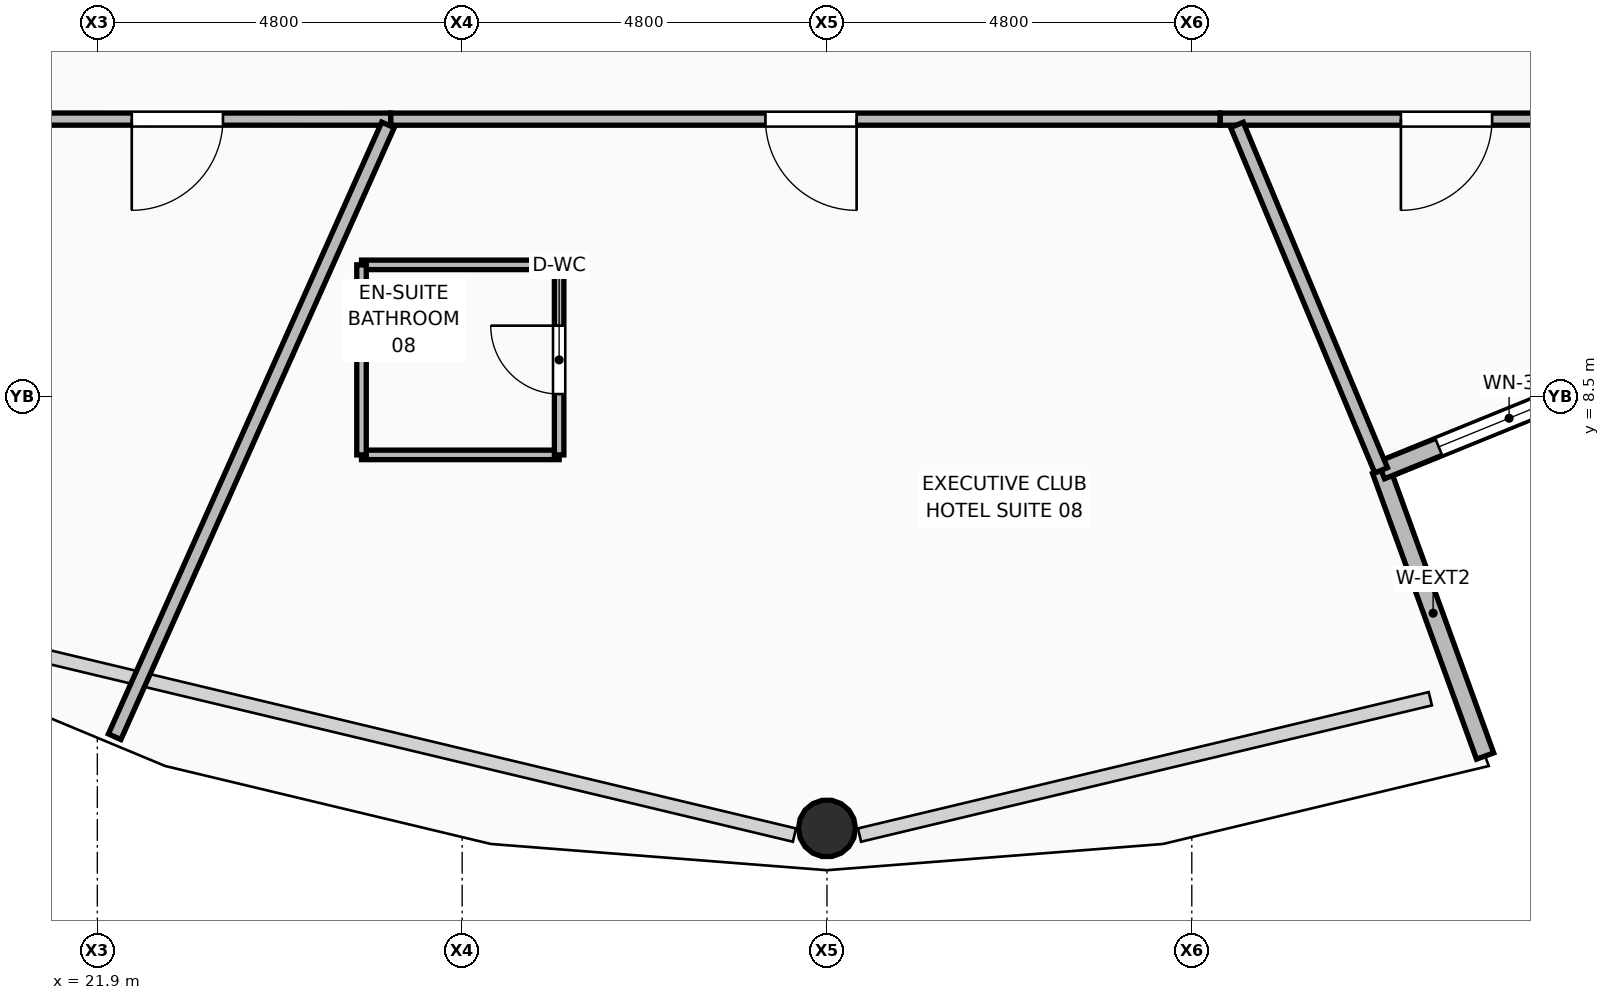
"""IFC4 building model, lengths in metres.
Left out: names, types, materials, properties, quantities, classifications, styles, units other than length and angle.
Written with IfcOpenShell. Run it as: python <this file> out.ifc"""

import sys

from ifc_helpers import new_model, si_unit, direction, frame, frame_2d, origin, origin_2d, place, context, subcontext, project, spatial, rectangle, hollow_circle, extrude, element, fill, save


model = new_model("IFC4")
c1 = context("Model", 3, precision=1e-05, world=origin(), true_north=direction((0.0, 1.0)))
c2 = subcontext(c1, "Body", "Model", "MODEL_VIEW")
j1 = project(units=[si_unit("LENGTHUNIT", "METRE"), si_unit("PLANEANGLEUNIT", "RADIAN")], contexts=[c1])
p1 = place(None, origin())
s1 = spatial("IfcSite", under=j1, at=p1, CompositionType="ELEMENT")
p2 = place(p1, origin())
s2 = spatial("IfcBuilding", under=s1, at=p2, CompositionType="ELEMENT")
p3 = place(p2, frame((0.0, 0.0, 142.2)))
s3 = spatial("IfcBuildingStorey", under=s2, at=p3, CompositionType="ELEMENT", Elevation=142.2)
p4 = place(p3, frame((31.5, 2.82, 0.0), z_axis=(0.0, 0.015658341295, 0.999877400659), x_axis=(-1.0, 0.0, 0.0)))
e1 = element("IfcColumn", 1, at=p4, inside=s3, PredefinedType="COLUMN", context=c2, shape_type="SweptSolid", body=[
    extrude(hollow_circle(Radius=0.375, WallThickness=0.035, at=origin_2d()), origin(), (0.0, 0.0, 1.0), 3.571),
])
p5 = place(p3, frame((40.159, 3.772, 0.0), z_axis=(0.0, 0.0, 1.0), x_axis=(-0.341963571582, 0.939713209288, 0.0)))
e2 = element("IfcWall", 2, at=p5, inside=s3, PredefinedType="SOLIDWALL", context=c2, shape_type="SweptSolid", body=[
    extrude(rectangle(XDim=4.0, YDim=0.24, at=frame_2d((2.0, 0.0))), origin(), (0.0, 0.0, 1.0), 3.57),
])
p6 = place(p3, frame((38.791, 7.531, 0.0), z_axis=(0.0, 0.0, 1.0), x_axis=(0.926307714527, 0.37676785692, 0.0)))
e3 = element("IfcWall", 3, at=p6, inside=s3, PredefinedType="SOLIDWALL", context=c2, shape_type="SweptSolid", body=[
    extrude(rectangle(XDim=3.636, YDim=0.24, at=frame_2d((1.818, 0.0))), origin(), (0.0, 0.0, 1.0), 3.57),
])
p7 = place(p6, frame((0.818, 0.0, 0.85)))
e4 = element("IfcOpeningElement", 4, at=p7, cuts=e3, PredefinedType="OPENING", context=c2, shape_type="SweptSolid", body=[
    extrude(rectangle(XDim=2.0, YDim=2.4, at=frame_2d((1.0, 1.2))), frame((0.0, 0.13, 0.0), z_axis=(0.0, -1.0, 0.0), x_axis=(1.0, 0.0, 0.0)), (0.0, 0.0, 1.0), 0.26),
])
p8 = place(p3, frame((42.926, 12.151, 0.0), z_axis=(0.0, 0.0, 1.0), x_axis=(-1.0, 0.0, 0.0)))
e5 = element("IfcWall", 5, at=p8, inside=s3, PredefinedType="PARTITIONING", context=c2, shape_type="SweptSolid", body=[
    extrude(rectangle(XDim=6.254, YDim=0.16, at=frame_2d((3.127, 0.0))), origin(), (0.0, 0.0, 1.0), 3.006),
])
p9 = place(p8, frame((2.675, 0.0, 0.0)))
e6 = element("IfcOpeningElement", 6, at=p9, cuts=e5, PredefinedType="OPENING", context=c2, shape_type="SweptSolid", body=[
    extrude(rectangle(XDim=1.2, YDim=2.1, at=frame_2d((0.6, 1.05))), frame((0.0, 0.09, 0.0), z_axis=(0.0, -1.0, 0.0), x_axis=(1.0, 0.0, 0.0)), (0.0, 0.0, 1.0), 0.18),
])
p10 = place(p3, frame((36.672, 12.151, 0.0), z_axis=(0.0, 0.0, 1.0), x_axis=(-1.0, 0.0, 0.0)))
e7 = element("IfcWall", 7, at=p10, inside=s3, PredefinedType="PARTITIONING", context=c2, shape_type="SweptSolid", body=[
    extrude(rectangle(XDim=10.913, YDim=0.16, at=frame_2d((5.457, 0.0))), origin(), (0.0, 0.0, 1.0), 3.006),
])
p11 = place(p10, frame((4.782, 0.0, 0.0)))
e8 = element("IfcOpeningElement", 8, at=p11, cuts=e7, PredefinedType="OPENING", context=c2, shape_type="SweptSolid", body=[
    extrude(rectangle(XDim=1.2, YDim=2.1, at=frame_2d((0.6, 1.05))), frame((0.0, 0.09, 0.0), z_axis=(0.0, -1.0, 0.0), x_axis=(1.0, 0.0, 0.0)), (0.0, 0.0, 1.0), 0.18),
])
p12 = place(p3, frame((25.759, 12.151, 0.0), z_axis=(0.0, 0.0, 1.0), x_axis=(-0.999999980593, 0.000197013275, 0.0)))
e9 = element("IfcWall", 9, at=p12, inside=s3, PredefinedType="PARTITIONING", context=c2, shape_type="SweptSolid", body=[
    extrude(rectangle(XDim=6.196, YDim=0.16, at=frame_2d((3.098, 0.0))), origin(), (0.0, 0.0, 1.0), 3.006),
])
p13 = place(p12, frame((2.206, 0.0, 0.0)))
e10 = element("IfcOpeningElement", 10, at=p13, cuts=e9, PredefinedType="OPENING", context=c2, shape_type="SweptSolid", body=[
    extrude(rectangle(XDim=1.2, YDim=2.1, at=frame_2d((0.6, 1.05))), frame((0.0, 0.09, 0.0), z_axis=(0.0, -1.0, 0.0), x_axis=(1.0, 0.0, 0.0)), (0.0, 0.0, 1.0), 0.18),
])
p14 = place(p3, frame((25.724, 12.075, 0.0), z_axis=(0.0, 0.0, 1.0), x_axis=(-0.407920906763, -0.913017269183, 0.0)))
e11 = element("IfcWall", 11, at=p14, inside=s3, PredefinedType="PARTITIONING", context=c2, shape_type="SweptSolid", body=[
    extrude(rectangle(XDim=8.816, YDim=0.18, at=frame_2d((4.408, 0.0))), origin(), (0.0, 0.0, 1.0), 2.852),
])
p15 = place(p3, frame((36.894, 12.075, 0.0), z_axis=(0.0, 0.0, 1.0), x_axis=(0.385248999584, -0.922812661551, 0.0)))
e12 = element("IfcWall", 12, at=p15, inside=s3, PredefinedType="PARTITIONING", context=c2, shape_type="SweptSolid", body=[
    extrude(rectangle(XDim=4.924, YDim=0.18, at=frame_2d((2.462, 0.0))), origin(), (0.0, 0.0, 1.0), 3.55),
])
for number, where, z_axis, x_axis in (
    (13, (25.376, 7.734, 0.0), (0.0, 0.0, 1.0), (1.0, 0.0, 0.0)),
    (14, (25.376, 10.234, 0.0), (0.0, 0.0, 1.0), (1.0, 0.0, 0.0)),
):
    element("IfcWall", number, at=place(p3, frame(where, z_axis=z_axis, x_axis=x_axis)), inside=s3, PredefinedType="PARTITIONING", context=c2, shape_type="SweptSolid", body=[
        extrude(rectangle(XDim=2.6, YDim=0.125, at=frame_2d((1.3, 0.0))), origin(), (0.0, 0.0, 1.0), 3.55),
    ])
p16 = place(p3, frame((25.376, 7.734, 0.0), z_axis=(0.0, 0.0, 1.0), x_axis=(0.0, 1.0, 0.0)))
e15 = element("IfcWall", 15, at=p16, inside=s3, PredefinedType="PARTITIONING", context=c2, shape_type="SweptSolid", body=[
    extrude(rectangle(XDim=2.5, YDim=0.125, at=frame_2d((1.25, 0.0))), origin(), (0.0, 0.0, 1.0), 3.55),
])
p17 = place(p3, frame((27.976, 7.734, 0.0), z_axis=(0.0, 0.0, 1.0), x_axis=(0.0, 1.0, 0.0)))
e16 = element("IfcWall", 16, at=p17, inside=s3, PredefinedType="PARTITIONING", context=c2, shape_type="SweptSolid", body=[
    extrude(rectangle(XDim=2.5, YDim=0.125, at=frame_2d((1.25, 0.0))), origin(), (0.0, 0.0, 1.0), 3.55),
])
p18 = place(p17, frame((0.8, 0.0, 0.0)))
e17 = element("IfcOpeningElement", 17, at=p18, cuts=e16, PredefinedType="OPENING", context=c2, shape_type="SweptSolid", body=[
    extrude(rectangle(XDim=0.9, YDim=2.1, at=frame_2d((0.45, 1.05))), frame((0.0, 0.073, 0.0), z_axis=(0.0, -1.0, 0.0), x_axis=(1.0, 0.0, 0.0)), (0.0, 0.0, 1.0), 0.145),
])
p19 = place(p7, origin())
e18 = element("IfcWindow", 18, at=p19, inside=s3, PartitioningType="SINGLE_PANEL", PredefinedType="WINDOW", context=c2, shape_type="SweptSolid", body=[
    extrude(rectangle(XDim=2.0, YDim=2.4, at=frame_2d((1.0, 1.2))), frame((0.0, 0.03, 0.0), z_axis=(0.0, -1.0, 0.0), x_axis=(1.0, 0.0, 0.0)), (0.0, 0.0, 1.0), 0.06),
])
fill(e4, e18)
p20 = place(p13, origin())
e19 = element("IfcDoor", 19, at=p20, inside=s3, OperationType="SINGLE_SWING_RIGHT", PredefinedType="DOOR", context=c2, shape_type="SweptSolid", body=[
    extrude(rectangle(XDim=1.2, YDim=2.1, at=frame_2d((0.6, 1.05))), frame((0.0, 0.025, 0.0), z_axis=(0.0, -1.0, 0.0), x_axis=(1.0, 0.0, 0.0)), (0.0, 0.0, 1.0), 0.05),
])
fill(e10, e19)
p21 = place(p18, origin())
e20 = element("IfcDoor", 20, at=p21, inside=s3, OperationType="SINGLE_SWING_RIGHT", PredefinedType="DOOR", context=c2, shape_type="SweptSolid", body=[
    extrude(rectangle(XDim=0.9, YDim=2.1, at=frame_2d((0.45, 1.05))), frame((0.0, 0.025, 0.0), z_axis=(0.0, -1.0, 0.0), x_axis=(1.0, 0.0, 0.0)), (0.0, 0.0, 1.0), 0.05),
])
fill(e17, e20)
p22 = place(p11, origin())
e21 = element("IfcDoor", 21, at=p22, inside=s3, OperationType="SINGLE_SWING_LEFT", PredefinedType="DOOR", context=c2, shape_type="SweptSolid", body=[
    extrude(rectangle(XDim=1.2, YDim=2.1, at=frame_2d((0.6, 1.05))), frame((0.0, 0.025, 0.0), z_axis=(0.0, -1.0, 0.0), x_axis=(1.0, 0.0, 0.0)), (0.0, 0.0, 1.0), 0.05),
])
fill(e8, e21)
p23 = place(p9, origin())
e22 = element("IfcDoor", 22, at=p23, inside=s3, OperationType="SINGLE_SWING_RIGHT", PredefinedType="DOOR", context=c2, shape_type="SweptSolid", body=[
    extrude(rectangle(XDim=1.2, YDim=2.1, at=frame_2d((0.6, 1.05))), frame((0.0, 0.025, 0.0), z_axis=(0.0, -1.0, 0.0), x_axis=(1.0, 0.0, 0.0)), (0.0, 0.0, 1.0), 0.05),
])
fill(e6, e22)
save(model, sys.argv[1])
